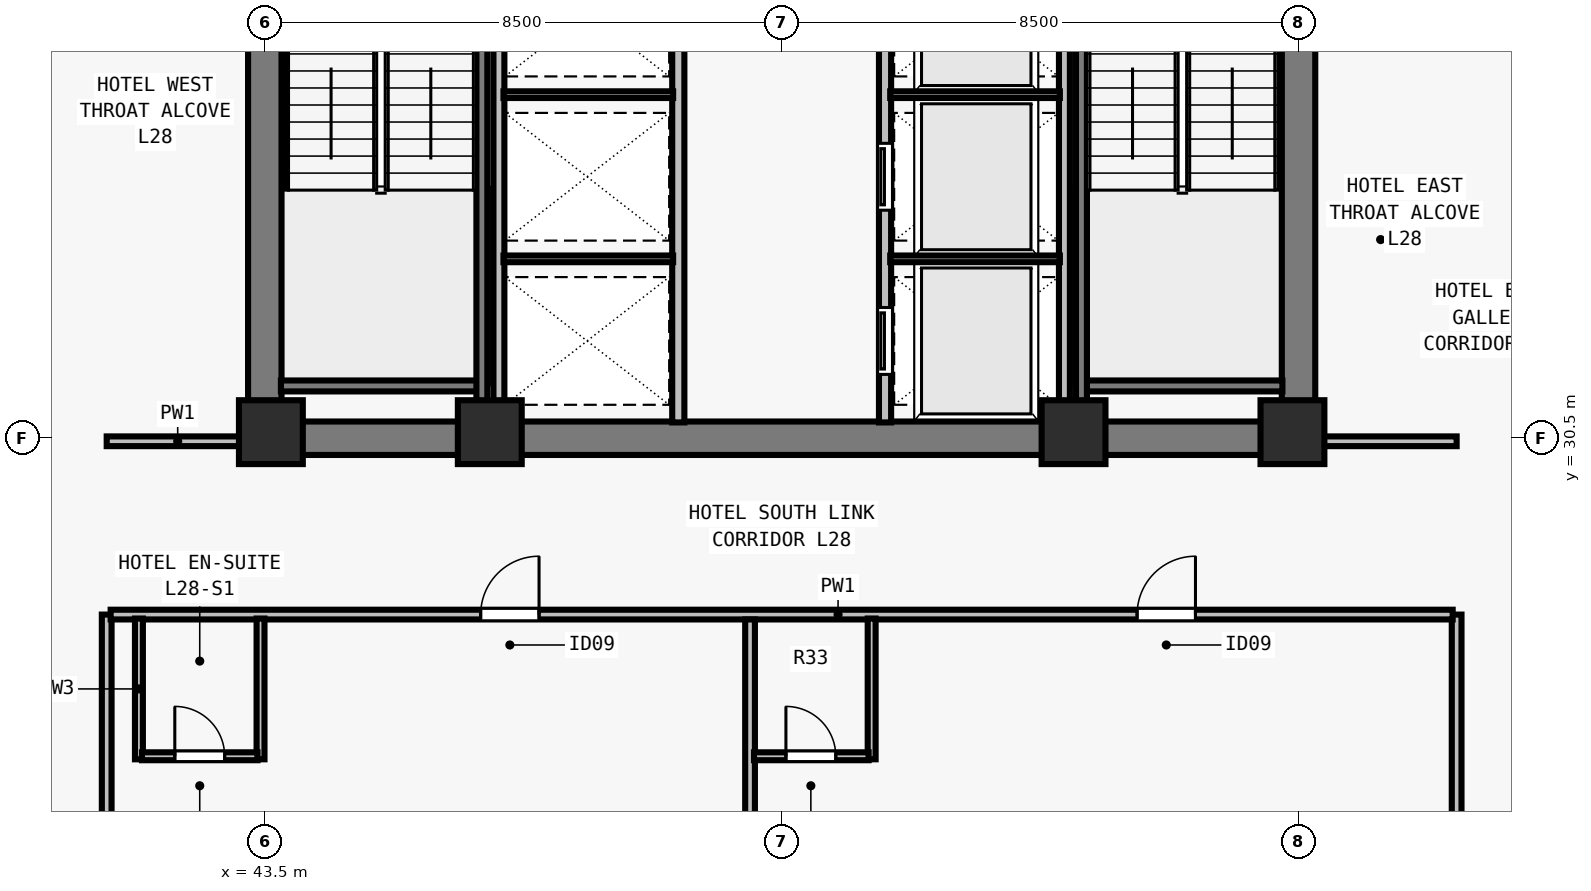
"""IFC4 building model, lengths in metres.
Left out: names, types, materials, properties, quantities, classifications, styles, units other than length and angle.
Written with IfcOpenShell. Run it as: python <this file> out.ifc"""

import sys

from ifc_helpers import new_model, si_unit, direction, frame, frame_2d, origin, origin_2d, place, context, subcontext, project, spatial, rectangle, extrude, element, fill, save


model = new_model("IFC4")
c1 = context("Model", 3, precision=1e-05, world=origin(), true_north=direction((0.0, 1.0)))
c2 = subcontext(c1, "Body", "Model", "MODEL_VIEW")
j1 = project(units=[si_unit("LENGTHUNIT", "METRE"), si_unit("PLANEANGLEUNIT", "RADIAN")], contexts=[c1])
p1 = place(None, origin())
s1 = spatial("IfcSite", under=j1, at=p1, CompositionType="ELEMENT")
p2 = place(p1, origin())
s2 = spatial("IfcBuilding", under=s1, at=p2, CompositionType="ELEMENT")
p3 = place(p2, frame((0.0, 0.0, 106.0)))
s3 = spatial("IfcBuildingStorey", under=s2, at=p3, CompositionType="ELEMENT", Elevation=106.0)
for number, where, z_axis, x_axis in (
    (1, (43.6, 30.6, 0.0), (0.0, 0.0, 1.0), (1.0, 0.0, 0.0)),
    (2, (47.2, 30.6, 0.0), (0.0, 0.0, 1.0), (1.0, 0.0, 0.0)),
    (3, (56.8, 30.6, 0.0), (0.0, 0.0, 1.0), (1.0, 0.0, 0.0)),
    (4, (60.4, 30.6, 0.0), (0.0, 0.0, 1.0), (1.0, 0.0, 0.0)),
):
    element("IfcColumn", number, at=place(p3, frame(where, z_axis=z_axis, x_axis=x_axis)), inside=s3, PredefinedType="COLUMN", context=c2, shape_type="SweptSolid", body=[
        extrude(rectangle(XDim=1.05, YDim=1.05, at=origin_2d()), origin(), (0.0, 0.0, 1.0), 3.5),
    ])
p4 = place(p3, frame((43.225, 30.5, 0.0), z_axis=(0.0, 0.0, 1.0), x_axis=(1.0, 0.0, 0.0)))
e5 = element("IfcWall", 5, at=p4, inside=s3, PredefinedType="SHEAR", context=c2, shape_type="SweptSolid", body=[
    extrude(rectangle(XDim=17.55, YDim=0.55, at=frame_2d((8.775, 0.0))), origin(), (0.0, 0.0, 1.0), 3.28),
])
for number, where, z_axis, x_axis in (
    (6, (43.5, 30.765, 0.0), (0.0, 0.0, 1.0), (0.0, 1.0, 0.0)),
    (7, (60.5, 30.765, 0.0), (0.0, 0.0, 1.0), (0.0, 1.0, 0.0)),
):
    element("IfcWall", number, at=place(p3, frame(where, z_axis=z_axis, x_axis=x_axis)), inside=s3, PredefinedType="SHEAR", context=c2, shape_type="SweptSolid", body=[
        extrude(rectangle(XDim=7.985, YDim=0.55, at=frame_2d((3.993, 0.0))), origin(), (0.0, 0.0, 1.0), 3.28),
    ])
p5 = place(p3, frame((50.3, 30.76, 0.0), z_axis=(0.0, 0.0, 1.0), x_axis=(0.0, 1.0, 0.0)))
e8 = element("IfcWall", 8, at=p5, inside=s3, PredefinedType="SOLIDWALL", context=c2, shape_type="SweptSolid", body=[
    extrude(rectangle(XDim=7.855, YDim=0.2, at=frame_2d((3.927, 0.0))), origin(), (0.0, 0.0, 1.0), 3.28),
])
p6 = place(p3, frame((53.7, 30.76, 0.0), z_axis=(0.0, 0.0, 1.0), x_axis=(0.0, 1.0, 0.0)))
e9 = element("IfcWall", 9, at=p6, inside=s3, PredefinedType="SOLIDWALL", context=c2, shape_type="SweptSolid", body=[
    extrude(rectangle(XDim=7.855, YDim=0.2, at=frame_2d((3.927, 0.0))), origin(), (0.0, 0.0, 1.0), 3.28),
])
p7 = place(p6, frame((0.79, 0.0, 0.0)))
e10 = element("IfcOpeningElement", 10, at=p7, cuts=e9, PredefinedType="OPENING", context=c2, shape_type="SweptSolid", body=[
    extrude(rectangle(XDim=1.1, YDim=2.2, at=frame_2d((0.55, 1.1))), frame((0.0, 0.11, 0.0), z_axis=(0.0, -1.0, 0.0), x_axis=(1.0, 0.0, 0.0)), (0.0, 0.0, 1.0), 0.22),
])
p8 = place(p6, frame((3.49, 0.0, 0.0)))
e11 = element("IfcOpeningElement", 11, at=p8, cuts=e9, PredefinedType="OPENING", context=c2, shape_type="SweptSolid", body=[
    extrude(rectangle(XDim=1.1, YDim=2.2, at=frame_2d((0.55, 1.1))), frame((0.0, 0.11, 0.0), z_axis=(0.0, -1.0, 0.0), x_axis=(1.0, 0.0, 0.0)), (0.0, 0.0, 1.0), 0.22),
])
p9 = place(p6, frame((6.19, 0.0, 0.0)))
e12 = element("IfcOpeningElement", 12, at=p9, cuts=e9, PredefinedType="OPENING", context=c2, shape_type="SweptSolid", body=[
    extrude(rectangle(XDim=1.1, YDim=2.2, at=frame_2d((0.55, 1.1))), frame((0.0, 0.11, 0.0), z_axis=(0.0, -1.0, 0.0), x_axis=(1.0, 0.0, 0.0)), (0.0, 0.0, 1.0), 0.22),
])
p10 = place(p3, frame((47.35, 30.76, 0.0), z_axis=(0.0, 0.0, 1.0), x_axis=(0.0, 1.0, 0.0)))
e13 = element("IfcWall", 13, at=p10, inside=s3, PredefinedType="SOLIDWALL", context=c2, shape_type="SweptSolid", body=[
    extrude(rectangle(XDim=7.855, YDim=0.18, at=frame_2d((3.927, 0.0))), origin(), (0.0, 0.0, 1.0), 3.28),
])
for number, where, z_axis, x_axis in (
    (14, (47.425, 33.45, 0.0), (0.0, 0.0, 1.0), (1.0, 0.0, 0.0)),
    (15, (47.425, 36.15, 0.0), (0.0, 0.0, 1.0), (1.0, 0.0, 0.0)),
):
    element("IfcWall", number, at=place(p3, frame(where, z_axis=z_axis, x_axis=x_axis)), inside=s3, PredefinedType="PARTITIONING", context=c2, shape_type="SweptSolid", body=[
        extrude(rectangle(XDim=2.79, YDim=0.11, at=frame_2d((1.395, 0.0))), origin(), (0.0, 0.0, 1.0), 3.28),
    ])
p11 = place(p3, frame((56.65, 30.76, 0.0), z_axis=(0.0, 0.0, 1.0), x_axis=(0.0, 1.0, 0.0)))
e16 = element("IfcWall", 16, at=p11, inside=s3, PredefinedType="SOLIDWALL", context=c2, shape_type="SweptSolid", body=[
    extrude(rectangle(XDim=7.855, YDim=0.18, at=frame_2d((3.927, 0.0))), origin(), (0.0, 0.0, 1.0), 3.28),
])
for number, where, z_axis, x_axis in (
    (17, (53.785, 33.45, 0.0), (0.0, 0.0, 1.0), (1.0, 0.0, 0.0)),
    (18, (53.785, 36.15, 0.0), (0.0, 0.0, 1.0), (1.0, 0.0, 0.0)),
):
    element("IfcWall", number, at=place(p3, frame(where, z_axis=z_axis, x_axis=x_axis)), inside=s3, PredefinedType="PARTITIONING", context=c2, shape_type="SweptSolid", body=[
        extrude(rectangle(XDim=2.79, YDim=0.11, at=frame_2d((1.395, 0.0))), origin(), (0.0, 0.0, 1.0), 3.28),
    ])
p12 = place(p3, frame((40.9, 15.325, 0.0), z_axis=(0.0, 0.0, 1.0), x_axis=(0.0, 1.0, 0.0)))
e19 = element("IfcWall", 19, at=p12, inside=s3, PredefinedType="PARTITIONING", context=c2, shape_type="SweptSolid", body=[
    extrude(rectangle(XDim=12.275, YDim=0.16, at=frame_2d((6.138, 0.0))), origin(), (0.0, 0.0, 1.0), 2.555),
])
p13 = place(p3, frame((40.9, 30.45, 0.0), z_axis=(0.0, 0.0, 1.0), x_axis=(1.0, 0.0, 0.0)))
e20 = element("IfcWall", 20, at=p13, inside=s3, PredefinedType="PARTITIONING", context=c2, shape_type="SweptSolid", body=[
    extrude(rectangle(XDim=2.335, YDim=0.16, at=frame_2d((1.167, 0.0))), origin(), (0.0, 0.0, 1.0), 3.28),
])
p14 = place(p3, frame((63.1, 15.325, 0.0), z_axis=(0.0, 0.0, 1.0), x_axis=(0.0, 1.0, 0.0)))
e21 = element("IfcWall", 21, at=p14, inside=s3, PredefinedType="PARTITIONING", context=c2, shape_type="SweptSolid", body=[
    extrude(rectangle(XDim=12.275, YDim=0.16, at=frame_2d((6.138, 0.0))), origin(), (0.0, 0.0, 1.0), 2.555),
])
p15 = place(p3, frame((60.765, 30.45, 0.0), z_axis=(0.0, 0.0, 1.0), x_axis=(1.0, 0.0, 0.0)))
e22 = element("IfcWall", 22, at=p15, inside=s3, PredefinedType="PARTITIONING", context=c2, shape_type="SweptSolid", body=[
    extrude(rectangle(XDim=2.335, YDim=0.16, at=frame_2d((1.167, 0.0))), origin(), (0.0, 0.0, 1.0), 3.28),
])
p16 = place(p3, frame((40.965, 27.6, 0.0), z_axis=(0.0, 0.0, 1.0), x_axis=(1.0, 0.0, 0.0)))
e23 = element("IfcWall", 23, at=p16, inside=s3, PredefinedType="PARTITIONING", context=c2, shape_type="SweptSolid", body=[
    extrude(rectangle(XDim=22.07, YDim=0.16, at=frame_2d((11.035, 0.0))), origin(), (0.0, 0.0, 1.0), 3.28),
])
p17 = place(p16, frame((6.085, 0.0, 0.0)))
e24 = element("IfcOpeningElement", 24, at=p17, cuts=e23, PredefinedType="OPENING", context=c2, shape_type="SweptSolid", body=[
    extrude(rectangle(XDim=0.96, YDim=2.15, at=frame_2d((0.48, 1.075))), frame((0.0, 0.09, 0.0), z_axis=(0.0, -1.0, 0.0), x_axis=(1.0, 0.0, 0.0)), (0.0, 0.0, 1.0), 0.18),
])
p18 = place(p16, frame((16.88, 0.0, 0.0)))
e25 = element("IfcOpeningElement", 25, at=p18, cuts=e23, PredefinedType="OPENING", context=c2, shape_type="SweptSolid", body=[
    extrude(rectangle(XDim=0.96, YDim=2.15, at=frame_2d((0.48, 1.075))), frame((0.0, 0.09, 0.0), z_axis=(0.0, -1.0, 0.0), x_axis=(1.0, 0.0, 0.0)), (0.0, 0.0, 1.0), 0.18),
])
for number, where, z_axis, x_axis in (
    (26, (41.43, 25.22, 0.0), (0.0, 0.0, 1.0), (0.0, 1.0, 0.0)),
    (27, (43.43, 25.22, 0.0), (0.0, 0.0, 1.0), (0.0, 1.0, 0.0)),
):
    element("IfcWall", number, at=place(p3, frame(where, z_axis=z_axis, x_axis=x_axis)), inside=s3, PredefinedType="PLUMBINGWALL", context=c2, shape_type="SweptSolid", body=[
        extrude(rectangle(XDim=2.315, YDim=0.13, at=frame_2d((1.157, 0.0))), origin(), (0.0, 0.0, 1.0), 3.28),
    ])
p19 = place(p3, frame((41.48, 25.27, 0.0), z_axis=(0.0, 0.0, 1.0), x_axis=(1.0, 0.0, 0.0)))
e28 = element("IfcWall", 28, at=p19, inside=s3, PredefinedType="PLUMBINGWALL", context=c2, shape_type="SweptSolid", body=[
    extrude(rectangle(XDim=1.9, YDim=0.13, at=frame_2d((0.95, 0.0))), origin(), (0.0, 0.0, 1.0), 3.28),
])
p20 = place(p19, frame((0.54, 0.0, 0.0)))
e29 = element("IfcOpeningElement", 29, at=p20, cuts=e28, PredefinedType="OPENING", context=c2, shape_type="SweptSolid", body=[
    extrude(rectangle(XDim=0.82, YDim=2.1, at=frame_2d((0.41, 1.05))), frame((0.0, 0.075, 0.0), z_axis=(0.0, -1.0, 0.0), x_axis=(1.0, 0.0, 0.0)), (0.0, 0.0, 1.0), 0.15),
])
p21 = place(p3, frame((51.48, 15.325, 0.0), z_axis=(0.0, 0.0, 1.0), x_axis=(0.0, 1.0, 0.0)))
e30 = element("IfcWall", 30, at=p21, inside=s3, PredefinedType="PARTITIONING", context=c2, shape_type="SweptSolid", body=[
    extrude(rectangle(XDim=12.195, YDim=0.16, at=frame_2d((6.098, 0.0))), origin(), (0.0, 0.0, 1.0), 2.896),
])
p22 = place(p3, frame((53.48, 25.22, 0.0), z_axis=(0.0, 0.0, 1.0), x_axis=(0.0, 1.0, 0.0)))
e31 = element("IfcWall", 31, at=p22, inside=s3, PredefinedType="PLUMBINGWALL", context=c2, shape_type="SweptSolid", body=[
    extrude(rectangle(XDim=2.315, YDim=0.13, at=frame_2d((1.157, 0.0))), origin(), (0.0, 0.0, 1.0), 2.896),
])
p23 = place(p3, frame((51.545, 25.27, 0.0), z_axis=(0.0, 0.0, 1.0), x_axis=(1.0, 0.0, 0.0)))
e32 = element("IfcWall", 32, at=p23, inside=s3, PredefinedType="PLUMBINGWALL", context=c2, shape_type="SweptSolid", body=[
    extrude(rectangle(XDim=1.885, YDim=0.13, at=frame_2d((0.942, 0.0))), origin(), (0.0, 0.0, 1.0), 3.28),
])
p24 = place(p23, frame((0.525, 0.0, 0.0)))
e33 = element("IfcOpeningElement", 33, at=p24, cuts=e32, PredefinedType="OPENING", context=c2, shape_type="SweptSolid", body=[
    extrude(rectangle(XDim=0.82, YDim=2.1, at=frame_2d((0.41, 1.05))), frame((0.0, 0.075, 0.0), z_axis=(0.0, -1.0, 0.0), x_axis=(1.0, 0.0, 0.0)), (0.0, 0.0, 1.0), 0.15),
])
p25 = place(p3, frame((43.765, 31.36, 0.0), z_axis=(0.0, 0.0, 1.0), x_axis=(1.0, 0.0, 0.0)))
e34 = element("IfcWall", 34, at=p25, inside=s3, PredefinedType="SOLIDWALL", context=c2, shape_type="SweptSolid", body=[
    extrude(rectangle(XDim=3.23, YDim=0.18, at=frame_2d((1.615, 0.0))), origin(), (0.0, 0.0, 1.0), 3.28),
])
p26 = place(p3, frame((47.07, 38.78, 0.0), z_axis=(0.0, 0.0, 1.0), x_axis=(0.0, -1.0, 0.0)))
e35 = element("IfcWall", 35, at=p26, inside=s3, PredefinedType="SOLIDWALL", context=c2, shape_type="SweptSolid", body=[
    extrude(rectangle(XDim=8.017, YDim=0.18, at=frame_2d((4.009, 0.0))), origin(), (0.0, 0.0, 1.0), 3.28),
])
p27 = place(p3, frame((57.005, 31.36, 0.0), z_axis=(0.0, 0.0, 1.0), x_axis=(1.0, 0.0, 0.0)))
e36 = element("IfcWall", 36, at=p27, inside=s3, PredefinedType="SOLIDWALL", context=c2, shape_type="SweptSolid", body=[
    extrude(rectangle(XDim=3.23, YDim=0.18, at=frame_2d((1.615, 0.0))), origin(), (0.0, 0.0, 1.0), 3.28),
])
p28 = place(p3, frame((56.93, 38.78, 0.0), z_axis=(0.0, 0.0, 1.0), x_axis=(0.0, -1.0, 0.0)))
e37 = element("IfcWall", 37, at=p28, inside=s3, PredefinedType="SOLIDWALL", context=c2, shape_type="SweptSolid", body=[
    extrude(rectangle(XDim=8.017, YDim=0.18, at=frame_2d((4.009, 0.0))), origin(), (0.0, 0.0, 1.0), 3.28),
])
p29 = place(p7, origin())
e38 = element("IfcDoor", 38, at=p29, inside=s3, OperationType="SLIDING_TO_LEFT", PredefinedType="DOOR", context=c2, shape_type="SweptSolid", body=[
    extrude(rectangle(XDim=1.1, YDim=2.2, at=frame_2d((0.55, 1.1))), frame((0.0, 0.025, 0.0), z_axis=(0.0, -1.0, 0.0), x_axis=(1.0, 0.0, 0.0)), (0.0, 0.0, 1.0), 0.05),
])
fill(e10, e38)
p30 = place(p8, origin())
e39 = element("IfcDoor", 39, at=p30, inside=s3, OperationType="SLIDING_TO_LEFT", PredefinedType="DOOR", context=c2, shape_type="SweptSolid", body=[
    extrude(rectangle(XDim=1.1, YDim=2.2, at=frame_2d((0.55, 1.1))), frame((0.0, 0.025, 0.0), z_axis=(0.0, -1.0, 0.0), x_axis=(1.0, 0.0, 0.0)), (0.0, 0.0, 1.0), 0.05),
])
fill(e11, e39)
p31 = place(p20, origin())
e40 = element("IfcDoor", 40, at=p31, inside=s3, OperationType="SINGLE_SWING_LEFT", PredefinedType="DOOR", context=c2, shape_type="SweptSolid", body=[
    extrude(rectangle(XDim=0.82, YDim=2.1, at=frame_2d((0.41, 1.05))), frame((0.0, 0.025, 0.0), z_axis=(0.0, -1.0, 0.0), x_axis=(1.0, 0.0, 0.0)), (0.0, 0.0, 1.0), 0.05),
])
fill(e29, e40)
p32 = place(p17, origin())
e41 = element("IfcDoor", 41, at=p32, inside=s3, OperationType="SINGLE_SWING_RIGHT", PredefinedType="DOOR", context=c2, shape_type="SweptSolid", body=[
    extrude(rectangle(XDim=0.96, YDim=2.15, at=frame_2d((0.48, 1.075))), frame((0.0, 0.025, 0.0), z_axis=(0.0, -1.0, 0.0), x_axis=(1.0, 0.0, 0.0)), (0.0, 0.0, 1.0), 0.05),
])
fill(e24, e41)
p33 = place(p24, origin())
e42 = element("IfcDoor", 42, at=p33, inside=s3, OperationType="SINGLE_SWING_LEFT", PredefinedType="DOOR", context=c2, shape_type="SweptSolid", body=[
    extrude(rectangle(XDim=0.82, YDim=2.1, at=frame_2d((0.41, 1.05))), frame((0.0, 0.025, 0.0), z_axis=(0.0, -1.0, 0.0), x_axis=(1.0, 0.0, 0.0)), (0.0, 0.0, 1.0), 0.05),
])
fill(e33, e42)
p34 = place(p18, origin())
e43 = element("IfcDoor", 43, at=p34, inside=s3, OperationType="SINGLE_SWING_RIGHT", PredefinedType="DOOR", context=c2, shape_type="SweptSolid", body=[
    extrude(rectangle(XDim=0.96, YDim=2.15, at=frame_2d((0.48, 1.075))), frame((0.0, 0.025, 0.0), z_axis=(0.0, -1.0, 0.0), x_axis=(1.0, 0.0, 0.0)), (0.0, 0.0, 1.0), 0.05),
])
fill(e25, e43)
save(model, sys.argv[1])
